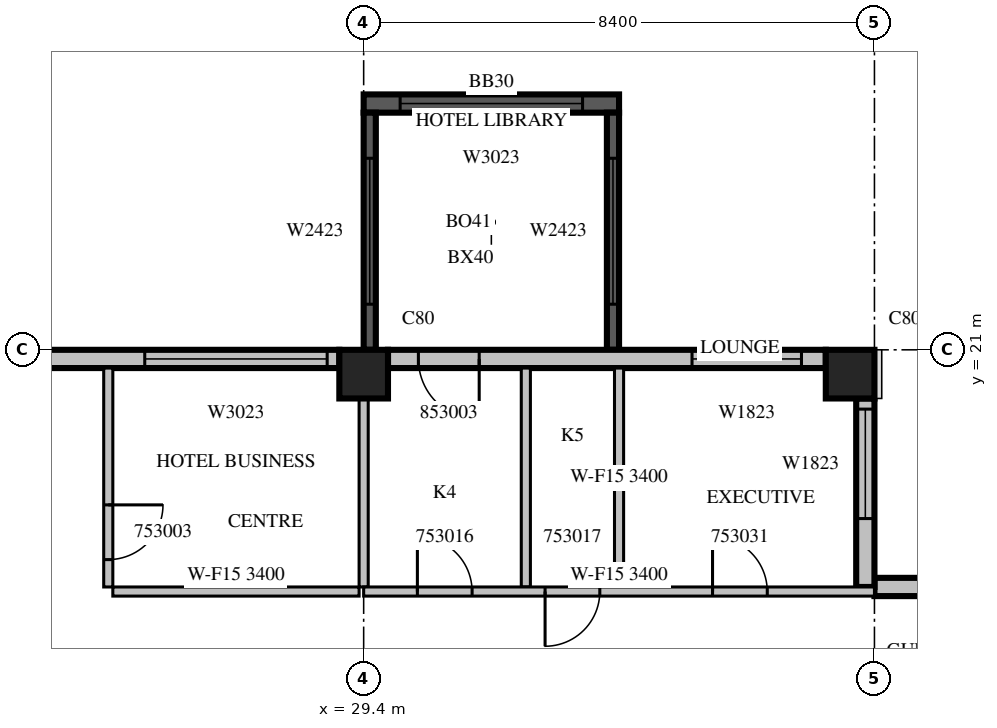
"""IFC4 building model, lengths in metres.
Left out: names, types, materials, properties, quantities, classifications, styles, units other than length and angle.
Written with IfcOpenShell. Run it as: python <this file> out.ifc"""

import sys

from ifc_helpers import new_model, si_unit, direction, frame, frame_2d, origin, origin_2d, place, context, subcontext, project, spatial, rectangle, extrude, source, transform, mapped, element, fill, save


model = new_model("IFC4")
c1 = context("Model", 3, precision=1e-05, world=origin(), true_north=direction((0.0, 1.0)))
c2 = subcontext(c1, "Body", "Model", "MODEL_VIEW")
j1 = project(units=[si_unit("LENGTHUNIT", "METRE"), si_unit("PLANEANGLEUNIT", "RADIAN")], contexts=[c1])
p1 = place(None, origin())
s1 = spatial("IfcSite", under=j1, at=p1, CompositionType="ELEMENT")
p2 = place(p1, origin())
s2 = spatial("IfcBuilding", under=s1, at=p2, CompositionType="ELEMENT")
p3 = place(p2, frame((0.0, 0.0, 234.8)))
s3 = spatial("IfcBuildingStorey", under=s2, at=p3, CompositionType="ELEMENT", Elevation=234.8)
m1 = source(origin(), c2, "Body", "SweptSolid", [
    extrude(rectangle(XDim=0.8, YDim=0.8, at=origin_2d()), origin(), (0.0, 0.0, 1.0), 3.8),
])
for number, where, z_axis, x_axis in (
    (1, (29.4, 20.6, 0.0), (0.0, 0.0, 1.0), (1.0, 0.0, 0.0)),
    (2, (37.4, 20.6, 0.0), (0.0, 0.0, 1.0), (1.0, 0.0, 0.0)),
):
    element("IfcColumn", number, at=place(p3, frame(where, z_axis=z_axis, x_axis=x_axis)), inside=s3, PredefinedType="COLUMN", context=c2, shape_type="MappedRepresentation", body=[
        mapped(m1, transform((0.0, 0.0, 0.0), scale=1.0)),
    ])
m2 = source(origin(), c2, "Body", "SweptSolid", [
    extrude(rectangle(XDim=4.2, YDim=0.3, at=frame_2d((2.1, 0.0))), origin(), (0.0, 0.0, 1.0), 3.4),
])
p4 = place(p3, frame((33.6, 25.05, 0.0), z_axis=(0.0, 0.0, 1.0), x_axis=(-1.0, 0.0, 0.0)))
e3 = element("IfcWall", 3, at=p4, inside=s3, PredefinedType="SOLIDWALL", context=c2, shape_type="MappedRepresentation", body=[
    mapped(m2, transform((0.0, 0.0, 0.0), scale=1.0)),
])
m3 = source(origin(), c2, "Body", "SweptSolid", [
    extrude(rectangle(XDim=3.0, YDim=2.3, at=frame_2d((1.5, 1.15))), frame((0.0, 0.16, 0.0), z_axis=(0.0, -1.0, 0.0), x_axis=(1.0, 0.0, 0.0)), (0.0, 0.0, 1.0), 0.32),
])
p5 = place(p4, frame((0.6, 0.0, 0.6)))
e4 = element("IfcOpeningElement", 4, at=p5, cuts=e3, PredefinedType="OPENING", context=c2, shape_type="MappedRepresentation", body=[
    mapped(m3, transform((0.0, 0.0, 0.0), scale=1.0)),
])
m4 = source(origin(), c2, "Body", "SweptSolid", [
    extrude(rectangle(XDim=3.9, YDim=0.2, at=frame_2d((1.95, 0.0))), origin(), (0.0, 0.0, 1.0), 3.4),
])
p6 = place(p3, frame((33.5, 21.0, 0.0), z_axis=(0.0, 0.0, 1.0), x_axis=(0.0, 1.0, 0.0)))
e5 = element("IfcWall", 5, at=p6, inside=s3, PredefinedType="SOLIDWALL", context=c2, shape_type="MappedRepresentation", body=[
    mapped(m4, transform((0.0, 0.0, 0.0), scale=1.0)),
])
m5 = source(origin(), c2, "Body", "SweptSolid", [
    extrude(rectangle(XDim=2.4, YDim=2.3, at=frame_2d((1.2, 1.15))), frame((0.0, 0.11, 0.0), z_axis=(0.0, -1.0, 0.0), x_axis=(1.0, 0.0, 0.0)), (0.0, 0.0, 1.0), 0.22),
])
p7 = place(p6, frame((0.75, 0.0, 0.6)))
e6 = element("IfcOpeningElement", 6, at=p7, cuts=e5, PredefinedType="OPENING", context=c2, shape_type="MappedRepresentation", body=[
    mapped(m5, transform((0.0, 0.0, 0.0), scale=1.0)),
])
p8 = place(p3, frame((29.5, 21.0, 0.0), z_axis=(0.0, 0.0, 1.0), x_axis=(0.0, 1.0, 0.0)))
e7 = element("IfcWall", 7, at=p8, inside=s3, PredefinedType="SOLIDWALL", context=c2, shape_type="MappedRepresentation", body=[
    mapped(m4, transform((0.0, 0.0, 0.0), scale=1.0)),
])
p9 = place(p8, frame((0.75, 0.0, 0.6)))
e8 = element("IfcOpeningElement", 8, at=p9, cuts=e7, PredefinedType="OPENING", context=c2, shape_type="MappedRepresentation", body=[
    mapped(m5, transform((0.0, 0.0, 0.0), scale=1.0)),
])
m6 = source(origin(), c2, "Body", "SweptSolid", [
    extrude(rectangle(XDim=15.96, YDim=0.3, at=frame_2d((7.98, 0.0))), origin(), (0.0, 0.0, 1.0), 3.4),
])
p10 = place(p3, frame((53.76, 17.1, 0.0), z_axis=(0.0, 0.0, 1.0), x_axis=(-1.0, 0.0, 0.0)))
e9 = element("IfcWall", 9, at=p10, inside=s3, PredefinedType="STANDARD", context=c2, shape_type="MappedRepresentation", body=[
    mapped(m6, transform((0.0, 0.0, 0.0), scale=1.0)),
])
p11 = place(p10, frame((0.6, 0.0, 0.6)))
e10 = element("IfcOpeningElement", 10, at=p11, cuts=e9, PredefinedType="OPENING", context=c2, shape_type="MappedRepresentation", body=[
    mapped(m3, transform((0.0, 0.0, 0.0), scale=1.0)),
])
p12 = place(p10, frame((4.8, 0.0, 0.6)))
e11 = element("IfcOpeningElement", 11, at=p12, cuts=e9, PredefinedType="OPENING", context=c2, shape_type="MappedRepresentation", body=[
    mapped(m3, transform((0.0, 0.0, 0.0), scale=1.0)),
])
m7 = source(origin(), c2, "Body", "SweptSolid", [
    extrude(rectangle(XDim=3.6, YDim=2.3, at=frame_2d((1.8, 1.15))), frame((0.0, 0.16, 0.0), z_axis=(0.0, -1.0, 0.0), x_axis=(1.0, 0.0, 0.0)), (0.0, 0.0, 1.0), 0.32),
])
p13 = place(p10, frame((9.54, 0.0, 0.6)))
e12 = element("IfcOpeningElement", 12, at=p13, cuts=e9, PredefinedType="OPENING", context=c2, shape_type="MappedRepresentation", body=[
    mapped(m7, transform((0.0, 0.0, 0.0), scale=1.0)),
])
m8 = source(origin(), c2, "Body", "SweptSolid", [
    extrude(rectangle(XDim=3.1, YDim=0.3, at=frame_2d((1.55, 0.0))), origin(), (0.0, 0.0, 1.0), 3.4),
])
p14 = place(p3, frame((37.65, 17.1, 0.0), z_axis=(0.0, 0.0, 1.0), x_axis=(0.0, 1.0, 0.0)))
e13 = element("IfcWall", 13, at=p14, inside=s3, PredefinedType="STANDARD", context=c2, shape_type="MappedRepresentation", body=[
    mapped(m8, transform((0.0, 0.0, 0.0), scale=1.0)),
])
m9 = source(origin(), c2, "Body", "SweptSolid", [
    extrude(rectangle(XDim=1.8, YDim=2.3, at=frame_2d((0.9, 1.15))), frame((0.0, 0.16, 0.0), z_axis=(0.0, -1.0, 0.0), x_axis=(1.0, 0.0, 0.0)), (0.0, 0.0, 1.0), 0.32),
])
p15 = place(p14, frame((1.125, 0.0, 0.6)))
e14 = element("IfcOpeningElement", 14, at=p15, cuts=e13, PredefinedType="OPENING", context=c2, shape_type="MappedRepresentation", body=[
    mapped(m9, transform((0.0, 0.0, 0.0), scale=1.0)),
])
m10 = source(origin(), c2, "Body", "SweptSolid", [
    extrude(rectangle(XDim=7.2, YDim=0.3, at=frame_2d((3.6, 0.0))), origin(), (0.0, 0.0, 1.0), 3.4),
])
p16 = place(p3, frame((37.0, 20.85, 0.0), z_axis=(0.0, 0.0, 1.0), x_axis=(-1.0, 0.0, 0.0)))
e15 = element("IfcWall", 15, at=p16, inside=s3, PredefinedType="STANDARD", context=c2, shape_type="MappedRepresentation", body=[
    mapped(m10, transform((0.0, 0.0, 0.0), scale=1.0)),
])
p17 = place(p16, frame((0.4, 0.0, 0.6)))
e16 = element("IfcOpeningElement", 16, at=p17, cuts=e15, PredefinedType="OPENING", context=c2, shape_type="MappedRepresentation", body=[
    mapped(m9, transform((0.0, 0.0, 0.0), scale=1.0)),
])
m11 = source(origin(), c2, "Body", "SweptSolid", [
    extrude(rectangle(XDim=1.0, YDim=2.1, at=frame_2d((0.5, 1.05))), frame((0.0, 0.16, 0.0), z_axis=(0.0, -1.0, 0.0), x_axis=(1.0, 0.0, 0.0)), (0.0, 0.0, 1.0), 0.32),
])
p18 = place(p16, frame((5.7, 0.0, 0.0)))
e17 = element("IfcOpeningElement", 17, at=p18, cuts=e15, PredefinedType="OPENING", context=c2, shape_type="MappedRepresentation", body=[
    mapped(m11, transform((0.0, 0.0, 0.0), scale=1.0)),
])
p19 = place(p3, frame((29.0, 20.85, 0.0), z_axis=(0.0, 0.0, 1.0), x_axis=(-1.0, 0.0, 0.0)))
e18 = element("IfcWall", 18, at=p19, inside=s3, PredefinedType="STANDARD", context=c2, shape_type="MappedRepresentation", body=[
    mapped(m10, transform((0.0, 0.0, 0.0), scale=1.0)),
])
p20 = place(p19, frame((0.2, 0.0, 0.6)))
e19 = element("IfcOpeningElement", 19, at=p20, cuts=e18, PredefinedType="OPENING", context=c2, shape_type="MappedRepresentation", body=[
    mapped(m3, transform((0.0, 0.0, 0.0), scale=1.0)),
])
p21 = place(p19, frame((5.0, 0.0, 0.6)))
e20 = element("IfcOpeningElement", 20, at=p21, cuts=e18, PredefinedType="OPENING", context=c2, shape_type="MappedRepresentation", body=[
    mapped(m9, transform((0.0, 0.0, 0.0), scale=1.0)),
])
m12 = source(origin(), c2, "Body", "SweptSolid", [
    extrude(rectangle(XDim=3.6, YDim=0.15, at=frame_2d((1.8, 0.0))), origin(), (0.0, 0.0, 1.0), 3.4),
])
p22 = place(p3, frame((25.2, 20.7, 0.0), z_axis=(0.0, 0.0, 1.0), x_axis=(0.0, -1.0, 0.0)))
e21 = element("IfcWall", 21, at=p22, inside=s3, PredefinedType="PARTITIONING", context=c2, shape_type="MappedRepresentation", body=[
    mapped(m12, transform((0.0, 0.0, 0.0), scale=1.0)),
])
m13 = source(origin(), c2, "Body", "SweptSolid", [
    extrude(rectangle(XDim=0.9, YDim=2.1, at=frame_2d((0.45, 1.05))), frame((0.0, 0.085, 0.0), z_axis=(0.0, -1.0, 0.0), x_axis=(1.0, 0.0, 0.0)), (0.0, 0.0, 1.0), 0.17),
])
p23 = place(p22, frame((2.25, 0.0, 0.0)))
e22 = element("IfcOpeningElement", 22, at=p23, cuts=e21, PredefinedType="OPENING", context=c2, shape_type="MappedRepresentation", body=[
    mapped(m13, transform((0.0, 0.0, 0.0), scale=1.0)),
])
m14 = source(origin(), c2, "Body", "SweptSolid", [
    extrude(rectangle(XDim=4.05, YDim=0.15, at=frame_2d((2.025, 0.0))), origin(), (0.0, 0.0, 1.0), 3.4),
])
p24 = place(p3, frame((25.275, 17.025, 0.0), z_axis=(0.0, 0.0, 1.0), x_axis=(1.0, 0.0, 0.0)))
e23 = element("IfcWall", 23, at=p24, inside=s3, PredefinedType="PARTITIONING", context=c2, shape_type="MappedRepresentation", body=[
    mapped(m14, transform((0.0, 0.0, 0.0), scale=1.0)),
])
m15 = source(origin(), c2, "Body", "SweptSolid", [
    extrude(rectangle(XDim=3.101, YDim=0.15, at=frame_2d((1.55, 0.0))), origin(), (0.0, 0.0, 1.0), 3.4),
])
p25 = place(p3, frame((29.4, 17.1, 0.0), z_axis=(0.0, 0.0, 1.0), x_axis=(0.0, 1.0, 0.0)))
e24 = element("IfcWall", 24, at=p25, inside=s3, PredefinedType="PARTITIONING", context=c2, shape_type="MappedRepresentation", body=[
    mapped(m15, transform((0.0, 0.0, 0.0), scale=1.0)),
])
for number, where, z_axis, x_axis in (
    (25, (32.067, 20.7, 0.0), (0.0, 0.0, 1.0), (0.0, -1.0, 0.0)),
    (26, (33.6, 17.1, 0.0), (0.0, 0.0, 1.0), (0.0, 1.0, 0.0)),
):
    element("IfcWall", number, at=place(p3, frame(where, z_axis=z_axis, x_axis=x_axis)), inside=s3, PredefinedType="PARTITIONING", context=c2, shape_type="MappedRepresentation", body=[
        mapped(m12, transform((0.0, 0.0, 0.0), scale=1.0)),
    ])
m16 = source(origin(), c2, "Body", "SweptSolid", [
    extrude(rectangle(XDim=8.4, YDim=0.15, at=frame_2d((4.2, 0.0))), origin(), (0.0, 0.0, 1.0), 3.4),
])
p26 = place(p3, frame((29.4, 17.025, 0.0), z_axis=(0.0, 0.0, 1.0), x_axis=(1.0, 0.0, 0.0)))
e27 = element("IfcWall", 27, at=p26, inside=s3, PredefinedType="PARTITIONING", context=c2, shape_type="MappedRepresentation", body=[
    mapped(m16, transform((0.0, 0.0, 0.0), scale=1.0)),
])
p27 = place(p26, frame((0.883, 0.0, 0.0)))
e28 = element("IfcOpeningElement", 28, at=p27, cuts=e27, PredefinedType="OPENING", context=c2, shape_type="MappedRepresentation", body=[
    mapped(m13, transform((0.0, 0.0, 0.0), scale=1.0)),
])
p28 = place(p26, frame((2.983, 0.0, 0.0)))
e29 = element("IfcOpeningElement", 29, at=p28, cuts=e27, PredefinedType="OPENING", context=c2, shape_type="MappedRepresentation", body=[
    mapped(m13, transform((0.0, 0.0, 0.0), scale=1.0)),
])
p29 = place(p26, frame((5.737, 0.0, 0.0)))
e30 = element("IfcOpeningElement", 30, at=p29, cuts=e27, PredefinedType="OPENING", context=c2, shape_type="MappedRepresentation", body=[
    mapped(m13, transform((0.0, 0.0, 0.0), scale=1.0)),
])
m17 = source(origin(), c2, "Body", "SweptSolid", [
    extrude(rectangle(XDim=3.0, YDim=2.3, at=frame_2d((1.5, 1.15))), frame((0.0, 0.03, 0.0), z_axis=(0.0, -1.0, 0.0), x_axis=(1.0, 0.0, 0.0)), (0.0, 0.0, 1.0), 0.06),
])
p30 = place(p5, origin())
e31 = element("IfcWindow", 31, at=p30, inside=s3, PartitioningType="SINGLE_PANEL", PredefinedType="WINDOW", context=c2, shape_type="MappedRepresentation", body=[
    mapped(m17, transform((0.0, 0.0, 0.0), scale=1.0)),
])
fill(e4, e31)
m18 = source(origin(), c2, "Body", "SweptSolid", [
    extrude(rectangle(XDim=2.4, YDim=2.3, at=frame_2d((1.2, 1.15))), frame((0.0, 0.03, 0.0), z_axis=(0.0, -1.0, 0.0), x_axis=(1.0, 0.0, 0.0)), (0.0, 0.0, 1.0), 0.06),
])
p31 = place(p7, origin())
e32 = element("IfcWindow", 32, at=p31, inside=s3, PartitioningType="SINGLE_PANEL", PredefinedType="WINDOW", context=c2, shape_type="MappedRepresentation", body=[
    mapped(m18, transform((0.0, 0.0, 0.0), scale=1.0)),
])
fill(e6, e32)
p32 = place(p9, origin())
e33 = element("IfcWindow", 33, at=p32, inside=s3, PartitioningType="SINGLE_PANEL", PredefinedType="WINDOW", context=c2, shape_type="MappedRepresentation", body=[
    mapped(m18, transform((0.0, 0.0, 0.0), scale=1.0)),
])
fill(e8, e33)
m19 = source(origin(), c2, "Body", "SweptSolid", [
    extrude(rectangle(XDim=1.8, YDim=2.3, at=frame_2d((0.9, 1.15))), frame((0.0, 0.03, 0.0), z_axis=(0.0, -1.0, 0.0), x_axis=(1.0, 0.0, 0.0)), (0.0, 0.0, 1.0), 0.06),
])
p33 = place(p15, origin())
e34 = element("IfcWindow", 34, at=p33, inside=s3, PartitioningType="SINGLE_PANEL", PredefinedType="WINDOW", context=c2, shape_type="MappedRepresentation", body=[
    mapped(m19, transform((0.0, 0.0, 0.0), scale=1.0)),
])
fill(e14, e34)
p34 = place(p17, origin())
e35 = element("IfcWindow", 35, at=p34, inside=s3, PartitioningType="SINGLE_PANEL", PredefinedType="WINDOW", context=c2, shape_type="MappedRepresentation", body=[
    mapped(m19, transform((0.0, 0.0, 0.0), scale=1.0)),
])
fill(e16, e35)
p35 = place(p20, origin())
e36 = element("IfcWindow", 36, at=p35, inside=s3, PartitioningType="SINGLE_PANEL", PredefinedType="WINDOW", context=c2, shape_type="MappedRepresentation", body=[
    mapped(m17, transform((0.0, 0.0, 0.0), scale=1.0)),
])
fill(e19, e36)
m20 = source(origin(), c2, "Body", "SweptSolid", [
    extrude(rectangle(XDim=0.9, YDim=2.1, at=frame_2d((0.45, 1.05))), frame((0.0, 0.025, 0.0), z_axis=(0.0, -1.0, 0.0), x_axis=(1.0, 0.0, 0.0)), (0.0, 0.0, 1.0), 0.05),
])
p36 = place(p23, origin())
e37 = element("IfcDoor", 37, at=p36, inside=s3, OperationType="SINGLE_SWING_LEFT", PredefinedType="DOOR", context=c2, shape_type="MappedRepresentation", body=[
    mapped(m20, transform((0.0, 0.0, 0.0), scale=1.0)),
])
fill(e22, e37)
p37 = place(p27, origin())
e38 = element("IfcDoor", 38, at=p37, inside=s3, OperationType="SINGLE_SWING_LEFT", PredefinedType="DOOR", context=c2, shape_type="MappedRepresentation", body=[
    mapped(m20, transform((0.0, 0.0, 0.0), scale=1.0)),
])
fill(e28, e38)
p38 = place(p28, origin())
e39 = element("IfcDoor", 39, at=p38, inside=s3, OperationType="SINGLE_SWING_RIGHT", PredefinedType="DOOR", context=c2, shape_type="MappedRepresentation", body=[
    mapped(m20, transform((0.0, 0.0, 0.0), scale=1.0)),
])
fill(e29, e39)
p39 = place(p29, origin())
e40 = element("IfcDoor", 40, at=p39, inside=s3, OperationType="SINGLE_SWING_LEFT", PredefinedType="DOOR", context=c2, shape_type="MappedRepresentation", body=[
    mapped(m20, transform((0.0, 0.0, 0.0), scale=1.0)),
])
fill(e30, e40)
m21 = source(origin(), c2, "Body", "SweptSolid", [
    extrude(rectangle(XDim=1.0, YDim=2.1, at=frame_2d((0.5, 1.05))), frame((0.0, 0.025, 0.0), z_axis=(0.0, -1.0, 0.0), x_axis=(1.0, 0.0, 0.0)), (0.0, 0.0, 1.0), 0.05),
])
p40 = place(p18, origin())
e41 = element("IfcDoor", 41, at=p40, inside=s3, OperationType="SINGLE_SWING_LEFT", PredefinedType="DOOR", context=c2, shape_type="MappedRepresentation", body=[
    mapped(m21, transform((0.0, 0.0, 0.0), scale=1.0)),
])
fill(e17, e41)
save(model, sys.argv[1])
